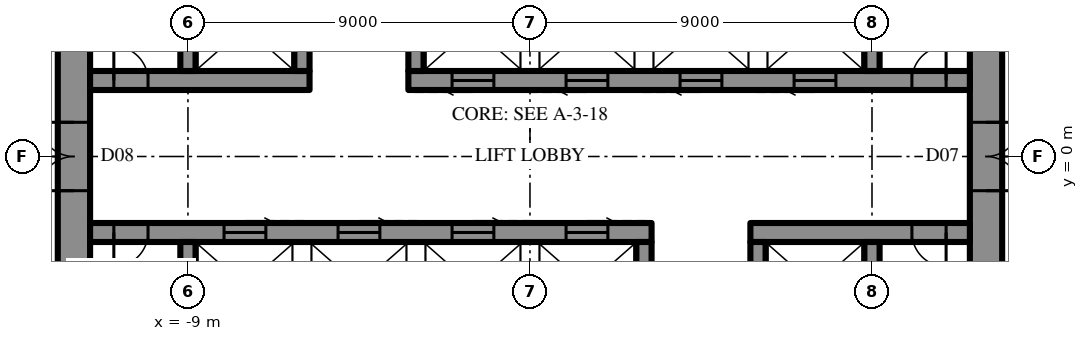
"""IFC4 building model, lengths in metres.
Left out: names, types, materials, properties, quantities, classifications, styles, units other than length and angle.
Written with IfcOpenShell. Run it as: python <this file> out.ifc"""

import sys

from ifc_helpers import new_model, si_unit, direction, frame, frame_2d, origin, place, context, subcontext, project, spatial, rectangle, extrude, element, fill, save


model = new_model("IFC4")
c1 = context("Model", 3, precision=1e-05, world=origin(), true_north=direction((0.0, 1.0)))
c2 = subcontext(c1, "Body", "Model", "MODEL_VIEW")
j1 = project(units=[si_unit("LENGTHUNIT", "METRE"), si_unit("PLANEANGLEUNIT", "RADIAN")], contexts=[c1])
p1 = place(None, origin())
s1 = spatial("IfcSite", under=j1, at=p1, CompositionType="ELEMENT")
p2 = place(p1, origin())
s2 = spatial("IfcBuilding", under=s1, at=p2, CompositionType="ELEMENT")
p3 = place(p2, frame((0.0, 0.0, 391.3)))
s3 = spatial("IfcBuildingStorey", under=s2, at=p3, CompositionType="ELEMENT", Elevation=391.3)
p4 = place(p3, frame((12.0, -10.7, 0.0), z_axis=(0.0, 0.0, 1.0), x_axis=(0.0, 1.0, 0.0)))
e1 = element("IfcWall", 1, at=p4, inside=s3, PredefinedType="SHEAR", context=c2, shape_type="SweptSolid", body=[
    extrude(rectangle(XDim=21.4, YDim=0.85, at=frame_2d((10.7, 0.0))), origin(), (0.0, 0.0, 1.0), 5.0),
])
p5 = place(p4, frame((9.8, 0.0, 0.0)))
e2 = element("IfcOpeningElement", 2, at=p5, cuts=e1, PredefinedType="OPENING", context=c2, shape_type="SweptSolid", body=[
    extrude(rectangle(XDim=1.8, YDim=2.4, at=frame_2d((0.9, 1.2))), frame((0.0, 0.435, 0.0), z_axis=(0.0, -1.0, 0.0), x_axis=(1.0, 0.0, 0.0)), (0.0, 0.0, 1.0), 0.87),
])
p6 = place(p3, frame((-12.0, 10.7, 0.0), z_axis=(0.0, 0.0, 1.0), x_axis=(0.0, -1.0, 0.0)))
e3 = element("IfcWall", 3, at=p6, inside=s3, PredefinedType="SHEAR", context=c2, shape_type="SweptSolid", body=[
    extrude(rectangle(XDim=21.4, YDim=0.85, at=frame_2d((10.7, 0.0))), origin(), (0.0, 0.0, 1.0), 5.0),
])
p7 = place(p6, frame((9.8, 0.0, 0.0)))
e4 = element("IfcOpeningElement", 4, at=p7, cuts=e3, PredefinedType="OPENING", context=c2, shape_type="SweptSolid", body=[
    extrude(rectangle(XDim=1.8, YDim=2.4, at=frame_2d((0.9, 1.2))), frame((0.0, 0.435, 0.0), z_axis=(0.0, -1.0, 0.0), x_axis=(1.0, 0.0, 0.0)), (0.0, 0.0, 1.0), 0.87),
])
p8 = place(p3, frame((-11.575, 2.0, 0.0), z_axis=(0.0, 0.0, 1.0), x_axis=(1.0, 0.0, 0.0)))
e5 = element("IfcWall", 5, at=p8, inside=s3, PredefinedType="SHEAR", context=c2, shape_type="SweptSolid", body=[
    extrude(rectangle(XDim=5.775, YDim=0.5, at=frame_2d((2.887, 0.0))), origin(), (0.0, 0.0, 1.0), 5.0),
])
p9 = place(p8, frame((0.625, 0.0, 0.0)))
e6 = element("IfcOpeningElement", 6, at=p9, cuts=e5, PredefinedType="OPENING", context=c2, shape_type="SweptSolid", body=[
    extrude(rectangle(XDim=0.9, YDim=2.2, at=frame_2d((0.45, 1.1))), frame((0.0, 0.26, 0.0), z_axis=(0.0, -1.0, 0.0), x_axis=(1.0, 0.0, 0.0)), (0.0, 0.0, 1.0), 0.52),
])
p10 = place(p3, frame((-3.2, 2.0, 0.0), z_axis=(0.0, 0.0, 1.0), x_axis=(1.0, 0.0, 0.0)))
e7 = element("IfcWall", 7, at=p10, inside=s3, PredefinedType="SHEAR", context=c2, shape_type="SweptSolid", body=[
    extrude(rectangle(XDim=14.775, YDim=0.5, at=frame_2d((7.387, 0.0))), origin(), (0.0, 0.0, 1.0), 5.0),
])
p11 = place(p10, frame((13.25, 0.0, 0.0)))
e8 = element("IfcOpeningElement", 8, at=p11, cuts=e7, PredefinedType="OPENING", context=c2, shape_type="SweptSolid", body=[
    extrude(rectangle(XDim=0.9, YDim=2.2, at=frame_2d((0.45, 1.1))), frame((0.0, 0.26, 0.0), z_axis=(0.0, -1.0, 0.0), x_axis=(1.0, 0.0, 0.0)), (0.0, 0.0, 1.0), 0.52),
])
p12 = place(p10, frame((1.15, 0.0, 0.0)))
e9 = element("IfcOpeningElement", 9, at=p12, cuts=e7, PredefinedType="OPENING", context=c2, shape_type="SweptSolid", body=[
    extrude(rectangle(XDim=1.1, YDim=2.2, at=frame_2d((0.55, 1.1))), frame((0.0, 0.26, 0.0), z_axis=(0.0, -1.0, 0.0), x_axis=(1.0, 0.0, 0.0)), (0.0, 0.0, 1.0), 0.52),
])
p13 = place(p10, frame((4.15, 0.0, 0.0)))
e10 = element("IfcOpeningElement", 10, at=p13, cuts=e7, PredefinedType="OPENING", context=c2, shape_type="SweptSolid", body=[
    extrude(rectangle(XDim=1.1, YDim=2.2, at=frame_2d((0.55, 1.1))), frame((0.0, 0.26, 0.0), z_axis=(0.0, -1.0, 0.0), x_axis=(1.0, 0.0, 0.0)), (0.0, 0.0, 1.0), 0.52),
])
p14 = place(p10, frame((7.15, 0.0, 0.0)))
e11 = element("IfcOpeningElement", 11, at=p14, cuts=e7, PredefinedType="OPENING", context=c2, shape_type="SweptSolid", body=[
    extrude(rectangle(XDim=1.1, YDim=2.2, at=frame_2d((0.55, 1.1))), frame((0.0, 0.26, 0.0), z_axis=(0.0, -1.0, 0.0), x_axis=(1.0, 0.0, 0.0)), (0.0, 0.0, 1.0), 0.52),
])
p15 = place(p10, frame((10.15, 0.0, 0.0)))
e12 = element("IfcOpeningElement", 12, at=p15, cuts=e7, PredefinedType="OPENING", context=c2, shape_type="SweptSolid", body=[
    extrude(rectangle(XDim=1.1, YDim=2.2, at=frame_2d((0.55, 1.1))), frame((0.0, 0.26, 0.0), z_axis=(0.0, -1.0, 0.0), x_axis=(1.0, 0.0, 0.0)), (0.0, 0.0, 1.0), 0.52),
])
for number, where, z_axis, x_axis in (
    (13, (-9.0, 2.25, 0.0), (0.0, 0.0, 1.0), (0.0, 1.0, 0.0)),
    (14, (-6.0, 2.25, 0.0), (0.0, 0.0, 1.0), (0.0, 1.0, 0.0)),
    (15, (-3.0, 2.25, 0.0), (0.0, 0.0, 1.0), (0.0, 1.0, 0.0)),
    (16, (9.0, 2.25, 0.0), (0.0, 0.0, 1.0), (0.0, 1.0, 0.0)),
):
    element("IfcWall", number, at=place(p3, frame(where, z_axis=z_axis, x_axis=x_axis)), inside=s3, PredefinedType="SHEAR", context=c2, shape_type="SweptSolid", body=[
        extrude(rectangle(XDim=2.3, YDim=0.4, at=frame_2d((1.15, 0.0))), origin(), (0.0, 0.0, 1.0), 5.0),
    ])
p16 = place(p3, frame((11.575, -2.0, 0.0), z_axis=(0.0, 0.0, 1.0), x_axis=(-1.0, 0.0, 0.0)))
e17 = element("IfcWall", 17, at=p16, inside=s3, PredefinedType="SHEAR", context=c2, shape_type="SweptSolid", body=[
    extrude(rectangle(XDim=5.775, YDim=0.5, at=frame_2d((2.887, 0.0))), origin(), (0.0, 0.0, 1.0), 5.0),
])
p17 = place(p16, frame((0.625, 0.0, 0.0)))
e18 = element("IfcOpeningElement", 18, at=p17, cuts=e17, PredefinedType="OPENING", context=c2, shape_type="SweptSolid", body=[
    extrude(rectangle(XDim=0.9, YDim=2.2, at=frame_2d((0.45, 1.1))), frame((0.0, 0.26, 0.0), z_axis=(0.0, -1.0, 0.0), x_axis=(1.0, 0.0, 0.0)), (0.0, 0.0, 1.0), 0.52),
])
p18 = place(p3, frame((3.2, -2.0, 0.0), z_axis=(0.0, 0.0, 1.0), x_axis=(-1.0, 0.0, 0.0)))
e19 = element("IfcWall", 19, at=p18, inside=s3, PredefinedType="SHEAR", context=c2, shape_type="SweptSolid", body=[
    extrude(rectangle(XDim=14.775, YDim=0.5, at=frame_2d((7.387, 0.0))), origin(), (0.0, 0.0, 1.0), 5.0),
])
p19 = place(p18, frame((13.25, 0.0, 0.0)))
e20 = element("IfcOpeningElement", 20, at=p19, cuts=e19, PredefinedType="OPENING", context=c2, shape_type="SweptSolid", body=[
    extrude(rectangle(XDim=0.9, YDim=2.2, at=frame_2d((0.45, 1.1))), frame((0.0, 0.26, 0.0), z_axis=(0.0, -1.0, 0.0), x_axis=(1.0, 0.0, 0.0)), (0.0, 0.0, 1.0), 0.52),
])
p20 = place(p18, frame((1.15, 0.0, 0.0)))
e21 = element("IfcOpeningElement", 21, at=p20, cuts=e19, PredefinedType="OPENING", context=c2, shape_type="SweptSolid", body=[
    extrude(rectangle(XDim=1.1, YDim=2.2, at=frame_2d((0.55, 1.1))), frame((0.0, 0.26, 0.0), z_axis=(0.0, -1.0, 0.0), x_axis=(1.0, 0.0, 0.0)), (0.0, 0.0, 1.0), 0.52),
])
p21 = place(p18, frame((4.15, 0.0, 0.0)))
e22 = element("IfcOpeningElement", 22, at=p21, cuts=e19, PredefinedType="OPENING", context=c2, shape_type="SweptSolid", body=[
    extrude(rectangle(XDim=1.1, YDim=2.2, at=frame_2d((0.55, 1.1))), frame((0.0, 0.26, 0.0), z_axis=(0.0, -1.0, 0.0), x_axis=(1.0, 0.0, 0.0)), (0.0, 0.0, 1.0), 0.52),
])
p22 = place(p18, frame((7.15, 0.0, 0.0)))
e23 = element("IfcOpeningElement", 23, at=p22, cuts=e19, PredefinedType="OPENING", context=c2, shape_type="SweptSolid", body=[
    extrude(rectangle(XDim=1.1, YDim=2.2, at=frame_2d((0.55, 1.1))), frame((0.0, 0.26, 0.0), z_axis=(0.0, -1.0, 0.0), x_axis=(1.0, 0.0, 0.0)), (0.0, 0.0, 1.0), 0.52),
])
p23 = place(p18, frame((10.15, 0.0, 0.0)))
e24 = element("IfcOpeningElement", 24, at=p23, cuts=e19, PredefinedType="OPENING", context=c2, shape_type="SweptSolid", body=[
    extrude(rectangle(XDim=1.1, YDim=2.2, at=frame_2d((0.55, 1.1))), frame((0.0, 0.26, 0.0), z_axis=(0.0, -1.0, 0.0), x_axis=(1.0, 0.0, 0.0)), (0.0, 0.0, 1.0), 0.52),
])
for number, where, z_axis, x_axis in (
    (25, (9.0, -2.25, 0.0), (0.0, 0.0, 1.0), (0.0, -1.0, 0.0)),
    (26, (6.0, -2.25, 0.0), (0.0, 0.0, 1.0), (0.0, -1.0, 0.0)),
    (27, (3.0, -2.25, 0.0), (0.0, 0.0, 1.0), (0.0, -1.0, 0.0)),
    (28, (-9.0, -2.25, 0.0), (0.0, 0.0, 1.0), (0.0, -1.0, 0.0)),
):
    element("IfcWall", number, at=place(p3, frame(where, z_axis=z_axis, x_axis=x_axis)), inside=s3, PredefinedType="SHEAR", context=c2, shape_type="SweptSolid", body=[
        extrude(rectangle(XDim=2.3, YDim=0.4, at=frame_2d((1.15, 0.0))), origin(), (0.0, 0.0, 1.0), 5.0),
    ])
p24 = place(p5, frame((1.8, 0.0, 0.0), z_axis=(0.0, 0.0, 1.0), x_axis=(-1.0, 0.0, 0.0)))
e29 = element("IfcDoor", 29, at=p24, inside=s3, OperationType="DOUBLE_DOOR_SINGLE_SWING", PredefinedType="DOOR", context=c2, shape_type="SweptSolid", body=[
    extrude(rectangle(XDim=1.8, YDim=2.4, at=frame_2d((0.9, 1.2))), frame((0.0, 0.025, 0.0), z_axis=(0.0, -1.0, 0.0), x_axis=(1.0, 0.0, 0.0)), (0.0, 0.0, 1.0), 0.05),
])
fill(e2, e29)
p25 = place(p7, frame((1.8, 0.0, 0.0), z_axis=(0.0, 0.0, 1.0), x_axis=(-1.0, 0.0, 0.0)))
e30 = element("IfcDoor", 30, at=p25, inside=s3, OperationType="DOUBLE_DOOR_SINGLE_SWING", PredefinedType="DOOR", context=c2, shape_type="SweptSolid", body=[
    extrude(rectangle(XDim=1.8, YDim=2.4, at=frame_2d((0.9, 1.2))), frame((0.0, 0.025, 0.0), z_axis=(0.0, -1.0, 0.0), x_axis=(1.0, 0.0, 0.0)), (0.0, 0.0, 1.0), 0.05),
])
fill(e4, e30)
p26 = place(p9, origin())
e31 = element("IfcDoor", 31, at=p26, inside=s3, OperationType="SINGLE_SWING_RIGHT", PredefinedType="DOOR", context=c2, shape_type="SweptSolid", body=[
    extrude(rectangle(XDim=0.9, YDim=2.2, at=frame_2d((0.45, 1.1))), frame((0.0, 0.025, 0.0), z_axis=(0.0, -1.0, 0.0), x_axis=(1.0, 0.0, 0.0)), (0.0, 0.0, 1.0), 0.05),
])
fill(e6, e31)
p27 = place(p11, origin())
e32 = element("IfcDoor", 32, at=p27, inside=s3, OperationType="SINGLE_SWING_LEFT", PredefinedType="DOOR", context=c2, shape_type="SweptSolid", body=[
    extrude(rectangle(XDim=0.9, YDim=2.2, at=frame_2d((0.45, 1.1))), frame((0.0, 0.025, 0.0), z_axis=(0.0, -1.0, 0.0), x_axis=(1.0, 0.0, 0.0)), (0.0, 0.0, 1.0), 0.05),
])
fill(e8, e32)
p28 = place(p17, origin())
e33 = element("IfcDoor", 33, at=p28, inside=s3, OperationType="SINGLE_SWING_RIGHT", PredefinedType="DOOR", context=c2, shape_type="SweptSolid", body=[
    extrude(rectangle(XDim=0.9, YDim=2.2, at=frame_2d((0.45, 1.1))), frame((0.0, 0.025, 0.0), z_axis=(0.0, -1.0, 0.0), x_axis=(1.0, 0.0, 0.0)), (0.0, 0.0, 1.0), 0.05),
])
fill(e18, e33)
p29 = place(p19, origin())
e34 = element("IfcDoor", 34, at=p29, inside=s3, OperationType="SINGLE_SWING_LEFT", PredefinedType="DOOR", context=c2, shape_type="SweptSolid", body=[
    extrude(rectangle(XDim=0.9, YDim=2.2, at=frame_2d((0.45, 1.1))), frame((0.0, 0.025, 0.0), z_axis=(0.0, -1.0, 0.0), x_axis=(1.0, 0.0, 0.0)), (0.0, 0.0, 1.0), 0.05),
])
fill(e20, e34)
p30 = place(p12, frame((1.1, 0.0, 0.0), z_axis=(0.0, 0.0, 1.0), x_axis=(-1.0, 0.0, 0.0)))
e35 = element("IfcDoor", 35, at=p30, inside=s3, OperationType="SLIDING_TO_LEFT", PredefinedType="DOOR", context=c2, shape_type="SweptSolid", body=[
    extrude(rectangle(XDim=1.1, YDim=2.2, at=frame_2d((0.55, 1.1))), frame((0.0, 0.025, 0.0), z_axis=(0.0, -1.0, 0.0), x_axis=(1.0, 0.0, 0.0)), (0.0, 0.0, 1.0), 0.05),
])
fill(e9, e35)
p31 = place(p13, frame((1.1, 0.0, 0.0), z_axis=(0.0, 0.0, 1.0), x_axis=(-1.0, 0.0, 0.0)))
e36 = element("IfcDoor", 36, at=p31, inside=s3, OperationType="SLIDING_TO_LEFT", PredefinedType="DOOR", context=c2, shape_type="SweptSolid", body=[
    extrude(rectangle(XDim=1.1, YDim=2.2, at=frame_2d((0.55, 1.1))), frame((0.0, 0.025, 0.0), z_axis=(0.0, -1.0, 0.0), x_axis=(1.0, 0.0, 0.0)), (0.0, 0.0, 1.0), 0.05),
])
fill(e10, e36)
p32 = place(p14, frame((1.1, 0.0, 0.0), z_axis=(0.0, 0.0, 1.0), x_axis=(-1.0, 0.0, 0.0)))
e37 = element("IfcDoor", 37, at=p32, inside=s3, OperationType="SLIDING_TO_LEFT", PredefinedType="DOOR", context=c2, shape_type="SweptSolid", body=[
    extrude(rectangle(XDim=1.1, YDim=2.2, at=frame_2d((0.55, 1.1))), frame((0.0, 0.025, 0.0), z_axis=(0.0, -1.0, 0.0), x_axis=(1.0, 0.0, 0.0)), (0.0, 0.0, 1.0), 0.05),
])
fill(e11, e37)
p33 = place(p15, frame((1.1, 0.0, 0.0), z_axis=(0.0, 0.0, 1.0), x_axis=(-1.0, 0.0, 0.0)))
e38 = element("IfcDoor", 38, at=p33, inside=s3, OperationType="SLIDING_TO_LEFT", PredefinedType="DOOR", context=c2, shape_type="SweptSolid", body=[
    extrude(rectangle(XDim=1.1, YDim=2.2, at=frame_2d((0.55, 1.1))), frame((0.0, 0.025, 0.0), z_axis=(0.0, -1.0, 0.0), x_axis=(1.0, 0.0, 0.0)), (0.0, 0.0, 1.0), 0.05),
])
fill(e12, e38)
p34 = place(p20, frame((1.1, 0.0, 0.0), z_axis=(0.0, 0.0, 1.0), x_axis=(-1.0, 0.0, 0.0)))
e39 = element("IfcDoor", 39, at=p34, inside=s3, OperationType="SLIDING_TO_LEFT", PredefinedType="DOOR", context=c2, shape_type="SweptSolid", body=[
    extrude(rectangle(XDim=1.1, YDim=2.2, at=frame_2d((0.55, 1.1))), frame((0.0, 0.025, 0.0), z_axis=(0.0, -1.0, 0.0), x_axis=(1.0, 0.0, 0.0)), (0.0, 0.0, 1.0), 0.05),
])
fill(e21, e39)
p35 = place(p21, frame((1.1, 0.0, 0.0), z_axis=(0.0, 0.0, 1.0), x_axis=(-1.0, 0.0, 0.0)))
e40 = element("IfcDoor", 40, at=p35, inside=s3, OperationType="SLIDING_TO_LEFT", PredefinedType="DOOR", context=c2, shape_type="SweptSolid", body=[
    extrude(rectangle(XDim=1.1, YDim=2.2, at=frame_2d((0.55, 1.1))), frame((0.0, 0.025, 0.0), z_axis=(0.0, -1.0, 0.0), x_axis=(1.0, 0.0, 0.0)), (0.0, 0.0, 1.0), 0.05),
])
fill(e22, e40)
p36 = place(p22, frame((1.1, 0.0, 0.0), z_axis=(0.0, 0.0, 1.0), x_axis=(-1.0, 0.0, 0.0)))
e41 = element("IfcDoor", 41, at=p36, inside=s3, OperationType="SLIDING_TO_LEFT", PredefinedType="DOOR", context=c2, shape_type="SweptSolid", body=[
    extrude(rectangle(XDim=1.1, YDim=2.2, at=frame_2d((0.55, 1.1))), frame((0.0, 0.025, 0.0), z_axis=(0.0, -1.0, 0.0), x_axis=(1.0, 0.0, 0.0)), (0.0, 0.0, 1.0), 0.05),
])
fill(e23, e41)
p37 = place(p23, frame((1.1, 0.0, 0.0), z_axis=(0.0, 0.0, 1.0), x_axis=(-1.0, 0.0, 0.0)))
e42 = element("IfcDoor", 42, at=p37, inside=s3, OperationType="SLIDING_TO_LEFT", PredefinedType="DOOR", context=c2, shape_type="SweptSolid", body=[
    extrude(rectangle(XDim=1.1, YDim=2.2, at=frame_2d((0.55, 1.1))), frame((0.0, 0.025, 0.0), z_axis=(0.0, -1.0, 0.0), x_axis=(1.0, 0.0, 0.0)), (0.0, 0.0, 1.0), 0.05),
])
fill(e24, e42)
save(model, sys.argv[1])
